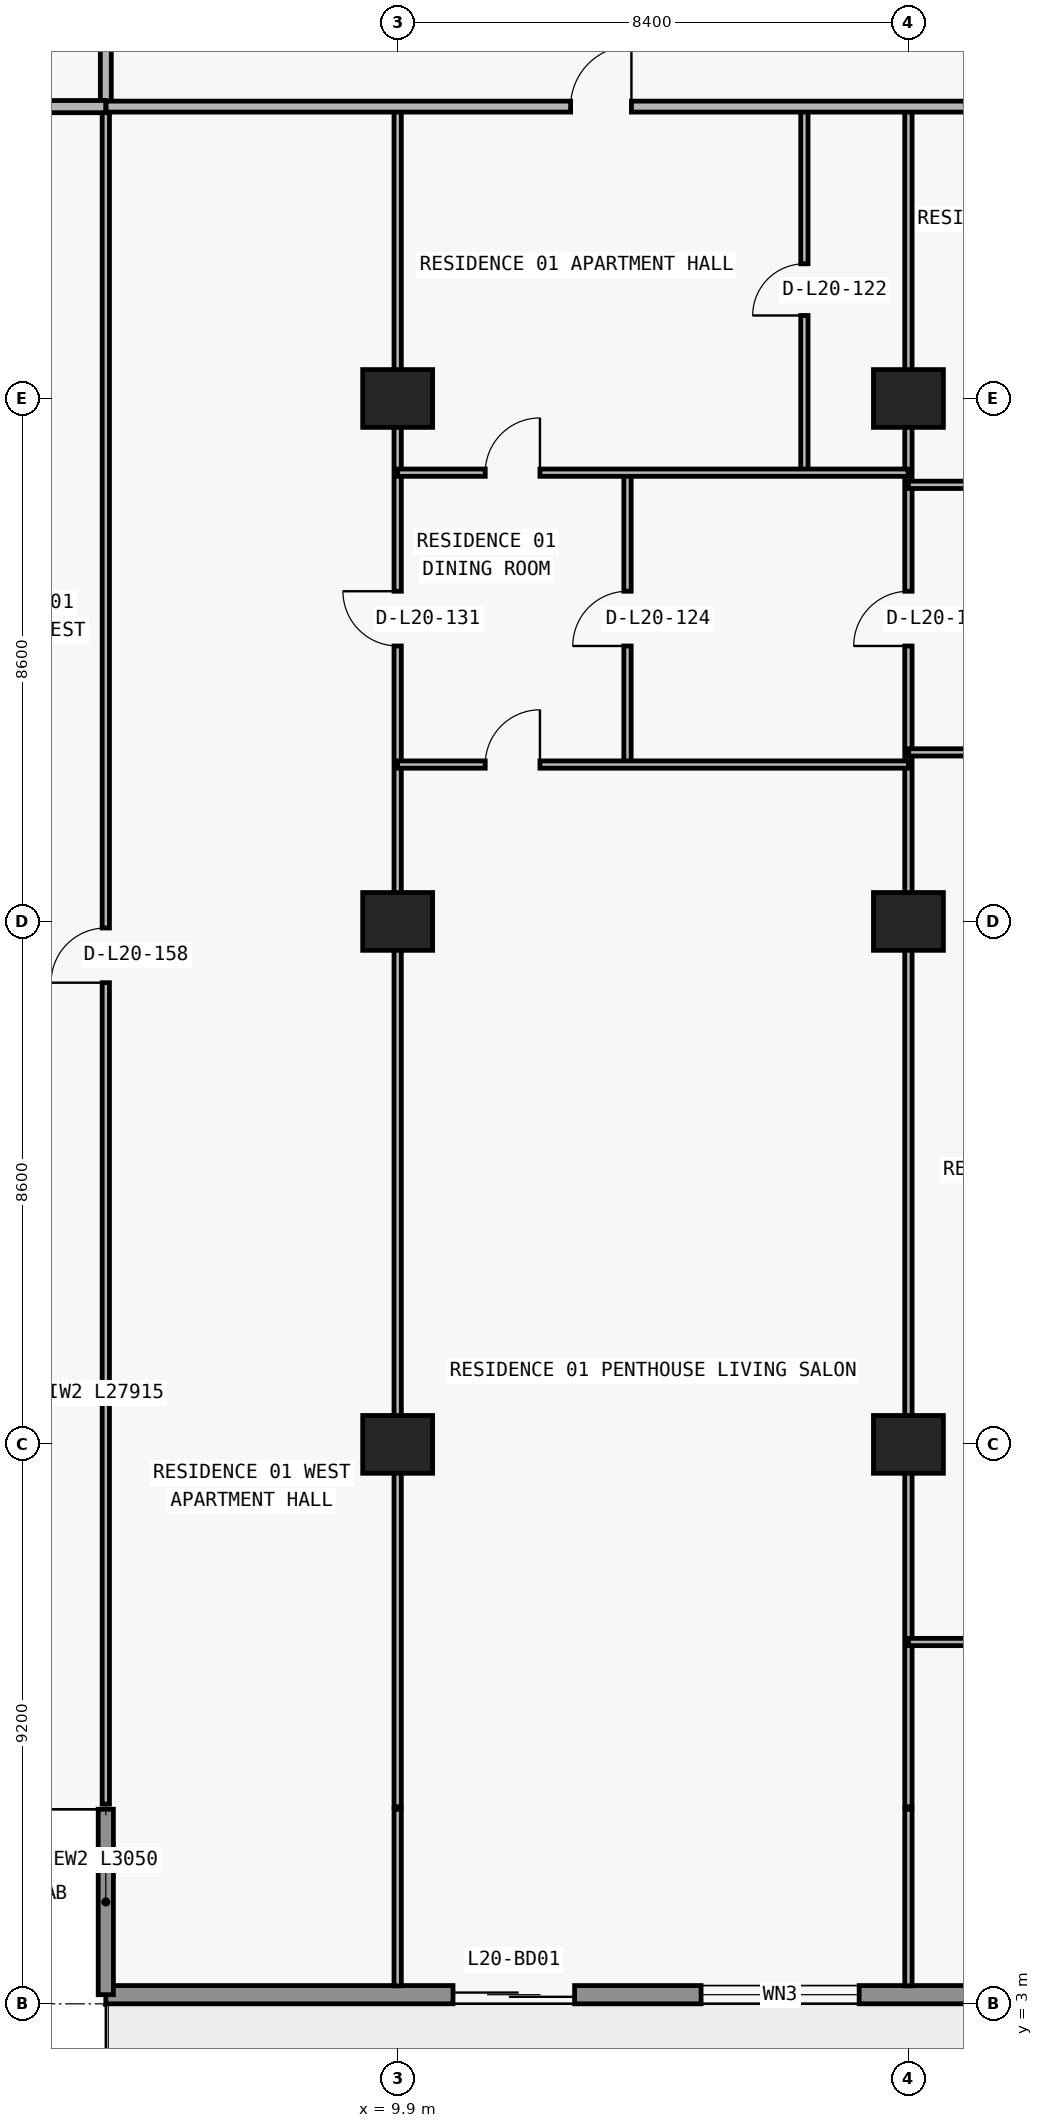
"""IFC4 building model, lengths in metres.
Left out: names, types, materials, properties, quantities, classifications, styles, units other than length and angle.
Written with IfcOpenShell. Run it as: python <this file> out.ifc"""

import sys

from ifc_helpers import new_model, si_unit, direction, frame, frame_2d, origin, origin_2d, place, context, subcontext, project, spatial, rectangle, extrude, element, fill, save


model = new_model("IFC4")
c1 = context("Model", 3, precision=1e-05, world=origin(), true_north=direction((0.0, 1.0)))
c2 = subcontext(c1, "Body", "Model", "MODEL_VIEW")
j1 = project(units=[si_unit("LENGTHUNIT", "METRE"), si_unit("PLANEANGLEUNIT", "RADIAN")], contexts=[c1])
p1 = place(None, origin())
s1 = spatial("IfcSite", under=j1, at=p1, CompositionType="ELEMENT")
p2 = place(p1, origin())
s2 = spatial("IfcBuilding", under=s1, at=p2, CompositionType="ELEMENT")
p3 = place(p2, frame((0.0, 0.0, 76.2)))
s3 = spatial("IfcBuildingStorey", under=s2, at=p3, CompositionType="ELEMENT", Elevation=76.2)
for number, where, z_axis, x_axis in (
    (1, (9.9, 12.2, 0.0), (0.0, 0.0, 1.0), (1.0, 0.0, 0.0)),
    (2, (18.3, 12.2, 0.0), (0.0, 0.0, 1.0), (1.0, 0.0, 0.0)),
    (3, (9.9, 20.8, 0.0), (0.0, 0.0, 1.0), (1.0, 0.0, 0.0)),
    (4, (18.3, 20.8, 0.0), (0.0, 0.0, 1.0), (1.0, 0.0, 0.0)),
    (5, (9.9, 29.4, 0.0), (0.0, 0.0, 1.0), (1.0, 0.0, 0.0)),
    (6, (18.3, 29.4, 0.0), (0.0, 0.0, 1.0), (1.0, 0.0, 0.0)),
):
    element("IfcColumn", number, at=place(p3, frame(where, z_axis=z_axis, x_axis=x_axis)), inside=s3, PredefinedType="COLUMN", context=c2, shape_type="SweptSolid", body=[
        extrude(rectangle(XDim=1.15, YDim=0.95, at=origin_2d()), origin(), (0.0, 0.0, 1.0), 3.0),
    ])
p4 = place(p3, frame((72.7, 3.15, 0.0), z_axis=(0.0, 0.0, 1.0), x_axis=(-1.0, 0.0, 0.0)))
e7 = element("IfcWall", 7, at=p4, inside=s3, PredefinedType="STANDARD", context=c2, shape_type="SweptSolid", body=[
    extrude(rectangle(XDim=67.6, YDim=0.3, at=frame_2d((33.8, 0.0))), origin(), (0.0, 0.0, 1.0), 3.0),
])
p5 = place(p4, frame((59.89, 0.0, 0.0)))
e8 = element("IfcOpeningElement", 8, at=p5, cuts=e7, PredefinedType="OPENING", context=c2, shape_type="SweptSolid", body=[
    extrude(rectangle(XDim=2.0, YDim=2.3, at=frame_2d((1.0, 1.15))), frame((0.0, 0.16, 0.0), z_axis=(0.0, -1.0, 0.0), x_axis=(1.0, 0.0, 0.0)), (0.0, 0.0, 1.0), 0.32),
])
p6 = place(p4, frame((55.21, 0.0, 0.65)))
e9 = element("IfcOpeningElement", 9, at=p6, cuts=e7, PredefinedType="OPENING", context=c2, shape_type="SweptSolid", body=[
    extrude(rectangle(XDim=2.6, YDim=1.85, at=frame_2d((1.3, 0.925))), frame((0.0, 0.16, 0.0), z_axis=(0.0, -1.0, 0.0), x_axis=(1.0, 0.0, 0.0)), (0.0, 0.0, 1.0), 0.32),
])
p7 = place(p4, frame((49.1, 0.0, 0.85)))
e10 = element("IfcOpeningElement", 10, at=p7, cuts=e7, PredefinedType="OPENING", context=c2, shape_type="SweptSolid", body=[
    extrude(rectangle(XDim=2.2, YDim=1.55, at=frame_2d((1.1, 0.775))), frame((0.0, 0.16, 0.0), z_axis=(0.0, -1.0, 0.0), x_axis=(1.0, 0.0, 0.0)), (0.0, 0.0, 1.0), 0.32),
])
p8 = place(p4, frame((43.09, 0.0, 0.0)))
e11 = element("IfcOpeningElement", 11, at=p8, cuts=e7, PredefinedType="OPENING", context=c2, shape_type="SweptSolid", body=[
    extrude(rectangle(XDim=2.0, YDim=2.3, at=frame_2d((1.0, 1.15))), frame((0.0, 0.16, 0.0), z_axis=(0.0, -1.0, 0.0), x_axis=(1.0, 0.0, 0.0)), (0.0, 0.0, 1.0), 0.32),
])
p9 = place(p4, frame((38.41, 0.0, 0.65)))
e12 = element("IfcOpeningElement", 12, at=p9, cuts=e7, PredefinedType="OPENING", context=c2, shape_type="SweptSolid", body=[
    extrude(rectangle(XDim=2.6, YDim=1.85, at=frame_2d((1.3, 0.925))), frame((0.0, 0.16, 0.0), z_axis=(0.0, -1.0, 0.0), x_axis=(1.0, 0.0, 0.0)), (0.0, 0.0, 1.0), 0.32),
])
p10 = place(p4, frame((32.7, 0.0, 0.85)))
e13 = element("IfcOpeningElement", 13, at=p10, cuts=e7, PredefinedType="OPENING", context=c2, shape_type="SweptSolid", body=[
    extrude(rectangle(XDim=2.2, YDim=1.55, at=frame_2d((1.1, 0.775))), frame((0.0, 0.16, 0.0), z_axis=(0.0, -1.0, 0.0), x_axis=(1.0, 0.0, 0.0)), (0.0, 0.0, 1.0), 0.32),
])
p11 = place(p4, frame((24.7, 0.0, 0.85)))
e14 = element("IfcOpeningElement", 14, at=p11, cuts=e7, PredefinedType="OPENING", context=c2, shape_type="SweptSolid", body=[
    extrude(rectangle(XDim=2.2, YDim=1.55, at=frame_2d((1.1, 0.775))), frame((0.0, 0.16, 0.0), z_axis=(0.0, -1.0, 0.0), x_axis=(1.0, 0.0, 0.0)), (0.0, 0.0, 1.0), 0.32),
])
p12 = place(p4, frame((18.69, 0.0, 0.0)))
e15 = element("IfcOpeningElement", 15, at=p12, cuts=e7, PredefinedType="OPENING", context=c2, shape_type="SweptSolid", body=[
    extrude(rectangle(XDim=2.0, YDim=2.3, at=frame_2d((1.0, 1.15))), frame((0.0, 0.16, 0.0), z_axis=(0.0, -1.0, 0.0), x_axis=(1.0, 0.0, 0.0)), (0.0, 0.0, 1.0), 0.32),
])
p13 = place(p4, frame((14.01, 0.0, 0.65)))
e16 = element("IfcOpeningElement", 16, at=p13, cuts=e7, PredefinedType="OPENING", context=c2, shape_type="SweptSolid", body=[
    extrude(rectangle(XDim=2.6, YDim=1.85, at=frame_2d((1.3, 0.925))), frame((0.0, 0.16, 0.0), z_axis=(0.0, -1.0, 0.0), x_axis=(1.0, 0.0, 0.0)), (0.0, 0.0, 1.0), 0.32),
])
p14 = place(p4, frame((7.9, 0.0, 0.85)))
e17 = element("IfcOpeningElement", 17, at=p14, cuts=e7, PredefinedType="OPENING", context=c2, shape_type="SweptSolid", body=[
    extrude(rectangle(XDim=2.2, YDim=1.55, at=frame_2d((1.1, 0.775))), frame((0.0, 0.16, 0.0), z_axis=(0.0, -1.0, 0.0), x_axis=(1.0, 0.0, 0.0)), (0.0, 0.0, 1.0), 0.32),
])
p15 = place(p3, frame((5.1, 6.2, 0.0), z_axis=(0.0, 0.0, 1.0), x_axis=(0.0, -1.0, 0.0)))
e18 = element("IfcWall", 18, at=p15, inside=s3, PredefinedType="ELEMENTEDWALL", context=c2, shape_type="SweptSolid", body=[
    extrude(rectangle(XDim=3.05, YDim=0.25, at=frame_2d((1.525, 0.0))), origin(), (0.0, 0.0, 1.0), 3.0),
])
p16 = place(p3, frame((5.1, 6.285, 0.0), z_axis=(0.0, 0.0, 1.0), x_axis=(0.0, 1.0, 0.0)))
e19 = element("IfcWall", 19, at=p16, inside=s3, PredefinedType="PARTITIONING", context=c2, shape_type="SweptSolid", body=[
    extrude(rectangle(XDim=27.915, YDim=0.12, at=frame_2d((13.958, 0.0))), origin(), (0.0, 0.0, 1.0), 3.0),
])
p17 = place(p16, frame((13.508, 0.0, 0.0)))
e20 = element("IfcOpeningElement", 20, at=p17, cuts=e19, PredefinedType="OPENING", context=c2, shape_type="SweptSolid", body=[
    extrude(rectangle(XDim=0.9, YDim=2.15, at=frame_2d((0.45, 1.075))), frame((0.0, 0.07, 0.0), z_axis=(0.0, -1.0, 0.0), x_axis=(1.0, 0.0, 0.0)), (0.0, 0.0, 1.0), 0.14),
])
p18 = place(p3, frame((5.1, 34.205, 0.0), z_axis=(0.0, 0.0, 1.0), x_axis=(0.0, 1.0, 0.0)))
e21 = element("IfcWall", 21, at=p18, inside=s3, PredefinedType="PARTITIONING", context=c2, shape_type="SweptSolid", body=[
    extrude(rectangle(XDim=2.695, YDim=0.18, at=frame_2d((1.347, 0.0))), origin(), (0.0, 0.0, 1.0), 3.0),
])
p19 = place(p3, frame((9.9, 3.295, 0.0), z_axis=(0.0, 0.0, 1.0), x_axis=(0.0, 1.0, 0.0)))
e22 = element("IfcWall", 22, at=p19, inside=s3, PredefinedType="PARTITIONING", context=c2, shape_type="SweptSolid", body=[
    extrude(rectangle(XDim=2.905, YDim=0.12, at=frame_2d((1.453, 0.0))), origin(), (0.0, 0.0, 1.0), 3.0),
])
p20 = place(p3, frame((9.9, 6.24, 0.0), z_axis=(0.0, 0.0, 1.0), x_axis=(0.0, 1.0, 0.0)))
e23 = element("IfcWall", 23, at=p20, inside=s3, PredefinedType="PARTITIONING", context=c2, shape_type="SweptSolid", body=[
    extrude(rectangle(XDim=27.96, YDim=0.12, at=frame_2d((13.98, 0.0))), origin(), (0.0, 0.0, 1.0), 2.06),
])
p21 = place(p20, frame((19.09, 0.0, 0.0)))
e24 = element("IfcOpeningElement", 24, at=p21, cuts=e23, PredefinedType="OPENING", context=c2, shape_type="SweptSolid", body=[
    extrude(rectangle(XDim=0.9, YDim=2.01, at=frame_2d((0.45, 1.005))), frame((0.0, 0.07, 0.0), z_axis=(0.0, -1.0, 0.0), x_axis=(1.0, 0.0, 0.0)), (0.0, 0.0, 1.0), 0.14),
])
p22 = place(p3, frame((13.68, 23.38, 0.0), z_axis=(0.0, 0.0, 1.0), x_axis=(0.0, 1.0, 0.0)))
e25 = element("IfcWall", 25, at=p22, inside=s3, PredefinedType="PARTITIONING", context=c2, shape_type="SweptSolid", body=[
    extrude(rectangle(XDim=4.8, YDim=0.12, at=frame_2d((2.4, 0.0))), origin(), (0.0, 0.0, 1.0), 3.0),
])
p23 = place(p22, frame((1.95, 0.0, 0.0)))
e26 = element("IfcOpeningElement", 26, at=p23, cuts=e25, PredefinedType="OPENING", context=c2, shape_type="SweptSolid", body=[
    extrude(rectangle(XDim=0.9, YDim=2.15, at=frame_2d((0.45, 1.075))), frame((0.0, 0.07, 0.0), z_axis=(0.0, -1.0, 0.0), x_axis=(1.0, 0.0, 0.0)), (0.0, 0.0, 1.0), 0.14),
])
p24 = place(p3, frame((16.589, 28.18, 0.0), z_axis=(0.0, 0.0, 1.0), x_axis=(0.0, 1.0, 0.0)))
e27 = element("IfcWall", 27, at=p24, inside=s3, PredefinedType="PARTITIONING", context=c2, shape_type="SweptSolid", body=[
    extrude(rectangle(XDim=6.02, YDim=0.12, at=frame_2d((3.01, 0.0))), origin(), (0.0, 0.0, 1.0), 3.0),
])
p25 = place(p24, frame((2.585, 0.0, 0.0)))
e28 = element("IfcOpeningElement", 28, at=p25, cuts=e27, PredefinedType="OPENING", context=c2, shape_type="SweptSolid", body=[
    extrude(rectangle(XDim=0.85, YDim=2.1, at=frame_2d((0.425, 1.05))), frame((0.0, 0.07, 0.0), z_axis=(0.0, -1.0, 0.0), x_axis=(1.0, 0.0, 0.0)), (0.0, 0.0, 1.0), 0.14),
])
p26 = place(p3, frame((18.3, 3.295, 0.0), z_axis=(0.0, 0.0, 1.0), x_axis=(0.0, 1.0, 0.0)))
e29 = element("IfcWall", 29, at=p26, inside=s3, PredefinedType="PARTITIONING", context=c2, shape_type="SweptSolid", body=[
    extrude(rectangle(XDim=2.905, YDim=0.12, at=frame_2d((1.453, 0.0))), origin(), (0.0, 0.0, 1.0), 3.0),
])
p27 = place(p3, frame((18.3, 6.24, 0.0), z_axis=(0.0, 0.0, 1.0), x_axis=(0.0, 1.0, 0.0)))
e30 = element("IfcWall", 30, at=p27, inside=s3, PredefinedType="PARTITIONING", context=c2, shape_type="SweptSolid", body=[
    extrude(rectangle(XDim=27.96, YDim=0.12, at=frame_2d((13.98, 0.0))), origin(), (0.0, 0.0, 1.0), 2.06),
])
p28 = place(p27, frame((19.09, 0.0, 0.0)))
e31 = element("IfcOpeningElement", 31, at=p28, cuts=e30, PredefinedType="OPENING", context=c2, shape_type="SweptSolid", body=[
    extrude(rectangle(XDim=0.9, YDim=2.01, at=frame_2d((0.45, 1.005))), frame((0.0, 0.07, 0.0), z_axis=(0.0, -1.0, 0.0), x_axis=(1.0, 0.0, 0.0)), (0.0, 0.0, 1.0), 0.14),
])
p29 = place(p3, frame((18.3, 8.95, 0.0), z_axis=(0.0, 0.0, 1.0), x_axis=(1.0, 0.0, 0.0)))
e32 = element("IfcWall", 32, at=p29, inside=s3, PredefinedType="PARTITIONING", context=c2, shape_type="SweptSolid", body=[
    extrude(rectangle(XDim=8.4, YDim=0.12, at=frame_2d((4.2, 0.0))), origin(), (0.0, 0.0, 1.0), 3.0),
])
p30 = place(p29, frame((3.75, 0.0, 0.0)))
e33 = element("IfcOpeningElement", 33, at=p30, cuts=e32, PredefinedType="OPENING", context=c2, shape_type="SweptSolid", body=[
    extrude(rectangle(XDim=0.9, YDim=2.15, at=frame_2d((0.45, 1.075))), frame((0.0, 0.07, 0.0), z_axis=(0.0, -1.0, 0.0), x_axis=(1.0, 0.0, 0.0)), (0.0, 0.0, 1.0), 0.14),
])
p31 = place(p3, frame((9.9, 23.38, 0.0), z_axis=(0.0, 0.0, 1.0), x_axis=(1.0, 0.0, 0.0)))
e34 = element("IfcWall", 34, at=p31, inside=s3, PredefinedType="PARTITIONING", context=c2, shape_type="SweptSolid", body=[
    extrude(rectangle(XDim=8.4, YDim=0.12, at=frame_2d((4.2, 0.0))), origin(), (0.0, 0.0, 1.0), 3.0),
])
p32 = place(p31, frame((1.44, 0.0, 0.0)))
e35 = element("IfcOpeningElement", 35, at=p32, cuts=e34, PredefinedType="OPENING", context=c2, shape_type="SweptSolid", body=[
    extrude(rectangle(XDim=0.9, YDim=2.15, at=frame_2d((0.45, 1.075))), frame((0.0, 0.07, 0.0), z_axis=(0.0, -1.0, 0.0), x_axis=(1.0, 0.0, 0.0)), (0.0, 0.0, 1.0), 0.14),
])
p33 = place(p3, frame((18.305, 23.58, 0.0), z_axis=(0.0, 0.0, 1.0), x_axis=(1.0, 0.0, 0.0)))
e36 = element("IfcWall", 36, at=p33, inside=s3, PredefinedType="PARTITIONING", context=c2, shape_type="SweptSolid", body=[
    extrude(rectangle(XDim=8.125, YDim=0.12, at=frame_2d((4.062, 0.0))), origin(), (0.0, 0.0, 1.0), 3.0),
])
p34 = place(p33, frame((3.613, 0.0, 0.0)))
e37 = element("IfcOpeningElement", 37, at=p34, cuts=e36, PredefinedType="OPENING", context=c2, shape_type="SweptSolid", body=[
    extrude(rectangle(XDim=0.9, YDim=2.15, at=frame_2d((0.45, 1.075))), frame((0.0, 0.07, 0.0), z_axis=(0.0, -1.0, 0.0), x_axis=(1.0, 0.0, 0.0)), (0.0, 0.0, 1.0), 0.14),
])
p35 = place(p3, frame((18.3, 27.98, 0.0), z_axis=(0.0, 0.0, 1.0), x_axis=(1.0, 0.0, 0.0)))
e38 = element("IfcWall", 38, at=p35, inside=s3, PredefinedType="PARTITIONING", context=c2, shape_type="SweptSolid", body=[
    extrude(rectangle(XDim=8.13, YDim=0.12, at=frame_2d((4.065, 0.0))), origin(), (0.0, 0.0, 1.0), 3.0),
])
p36 = place(p35, frame((2.979, 0.0, 0.0)))
e39 = element("IfcOpeningElement", 39, at=p36, cuts=e38, PredefinedType="OPENING", context=c2, shape_type="SweptSolid", body=[
    extrude(rectangle(XDim=0.9, YDim=2.15, at=frame_2d((0.45, 1.075))), frame((0.0, 0.07, 0.0), z_axis=(0.0, -1.0, 0.0), x_axis=(1.0, 0.0, 0.0)), (0.0, 0.0, 1.0), 0.14),
])
p37 = place(p3, frame((9.9, 28.18, 0.0), z_axis=(0.0, 0.0, 1.0), x_axis=(1.0, 0.0, 0.0)))
e40 = element("IfcWall", 40, at=p37, inside=s3, PredefinedType="PARTITIONING", context=c2, shape_type="SweptSolid", body=[
    extrude(rectangle(XDim=8.395, YDim=0.12, at=frame_2d((4.198, 0.0))), origin(), (0.0, 0.0, 1.0), 3.0),
])
p38 = place(p37, frame((1.44, 0.0, 0.0)))
e41 = element("IfcOpeningElement", 41, at=p38, cuts=e40, PredefinedType="OPENING", context=c2, shape_type="SweptSolid", body=[
    extrude(rectangle(XDim=0.9, YDim=2.15, at=frame_2d((0.45, 1.075))), frame((0.0, 0.07, 0.0), z_axis=(0.0, -1.0, 0.0), x_axis=(1.0, 0.0, 0.0)), (0.0, 0.0, 1.0), 0.14),
])
p39 = place(p3, frame((1.795, 34.2, 0.0), z_axis=(0.0, 0.0, 1.0), x_axis=(1.0, 0.0, 0.0)))
e42 = element("IfcWall", 42, at=p39, inside=s3, PredefinedType="PARTITIONING", context=c2, shape_type="SweptSolid", body=[
    extrude(rectangle(XDim=3.305, YDim=0.2, at=frame_2d((1.653, 0.0))), origin(), (0.0, 0.0, 1.0), 3.0),
])
p40 = place(p3, frame((5.105, 34.2, 0.0), z_axis=(0.0, 0.0, 1.0), x_axis=(1.0, 0.0, 0.0)))
e43 = element("IfcWall", 43, at=p40, inside=s3, PredefinedType="PARTITIONING", context=c2, shape_type="SweptSolid", body=[
    extrude(rectangle(XDim=67.595, YDim=0.18, at=frame_2d((33.797, 0.0))), origin(), (0.0, 0.0, 1.0), 3.0),
])
p41 = place(p40, frame((7.639, 0.0, 0.0)))
e44 = element("IfcOpeningElement", 44, at=p41, cuts=e43, PredefinedType="OPENING", context=c2, shape_type="SweptSolid", body=[
    extrude(rectangle(XDim=1.0, YDim=2.2, at=frame_2d((0.5, 1.1))), frame((0.0, 0.1, 0.0), z_axis=(0.0, -1.0, 0.0), x_axis=(1.0, 0.0, 0.0)), (0.0, 0.0, 1.0), 0.2),
])
p42 = place(p40, frame((24.423, 0.0, 0.0)))
e45 = element("IfcOpeningElement", 45, at=p42, cuts=e43, PredefinedType="OPENING", context=c2, shape_type="SweptSolid", body=[
    extrude(rectangle(XDim=1.0, YDim=2.2, at=frame_2d((0.5, 1.1))), frame((0.0, 0.1, 0.0), z_axis=(0.0, -1.0, 0.0), x_axis=(1.0, 0.0, 0.0)), (0.0, 0.0, 1.0), 0.2),
])
p43 = place(p40, frame((48.825, 0.0, 0.0)))
e46 = element("IfcOpeningElement", 46, at=p43, cuts=e43, PredefinedType="OPENING", context=c2, shape_type="SweptSolid", body=[
    extrude(rectangle(XDim=1.0, YDim=2.2, at=frame_2d((0.5, 1.1))), frame((0.0, 0.1, 0.0), z_axis=(0.0, -1.0, 0.0), x_axis=(1.0, 0.0, 0.0)), (0.0, 0.0, 1.0), 0.2),
])
p44 = place(p5, origin())
e47 = element("IfcDoor", 47, at=p44, inside=s3, OperationType="DOUBLE_DOOR_SLIDING", PredefinedType="DOOR", context=c2, shape_type="SweptSolid", body=[
    extrude(rectangle(XDim=2.0, YDim=2.3, at=frame_2d((1.0, 1.15))), frame((0.0, 0.025, 0.0), z_axis=(0.0, -1.0, 0.0), x_axis=(1.0, 0.0, 0.0)), (0.0, 0.0, 1.0), 0.05),
])
fill(e8, e47)
p45 = place(p6, origin())
e48 = element("IfcWindow", 48, at=p45, inside=s3, PartitioningType="SINGLE_PANEL", PredefinedType="WINDOW", context=c2, shape_type="SweptSolid", body=[
    extrude(rectangle(XDim=2.6, YDim=1.85, at=frame_2d((1.3, 0.925))), frame((0.0, 0.03, 0.0), z_axis=(0.0, -1.0, 0.0), x_axis=(1.0, 0.0, 0.0)), (0.0, 0.0, 1.0), 0.06),
])
fill(e9, e48)
p46 = place(p41, origin())
e49 = element("IfcDoor", 49, at=p46, inside=s3, OperationType="SINGLE_SWING_RIGHT", PredefinedType="DOOR", context=c2, shape_type="SweptSolid", body=[
    extrude(rectangle(XDim=1.0, YDim=2.2, at=frame_2d((0.5, 1.1))), frame((0.0, 0.025, 0.0), z_axis=(0.0, -1.0, 0.0), x_axis=(1.0, 0.0, 0.0)), (0.0, 0.0, 1.0), 0.05),
])
fill(e44, e49)
p47 = place(p25, origin())
e50 = element("IfcDoor", 50, at=p47, inside=s3, OperationType="SINGLE_SWING_LEFT", PredefinedType="DOOR", context=c2, shape_type="SweptSolid", body=[
    extrude(rectangle(XDim=0.85, YDim=2.1, at=frame_2d((0.425, 1.05))), frame((0.0, 0.025, 0.0), z_axis=(0.0, -1.0, 0.0), x_axis=(1.0, 0.0, 0.0)), (0.0, 0.0, 1.0), 0.05),
])
fill(e28, e50)
p48 = place(p38, origin())
e51 = element("IfcDoor", 51, at=p48, inside=s3, OperationType="SINGLE_SWING_RIGHT", PredefinedType="DOOR", context=c2, shape_type="SweptSolid", body=[
    extrude(rectangle(XDim=0.9, YDim=2.15, at=frame_2d((0.45, 1.075))), frame((0.0, 0.025, 0.0), z_axis=(0.0, -1.0, 0.0), x_axis=(1.0, 0.0, 0.0)), (0.0, 0.0, 1.0), 0.05),
])
fill(e41, e51)
p49 = place(p23, origin())
e52 = element("IfcDoor", 52, at=p49, inside=s3, OperationType="SINGLE_SWING_LEFT", PredefinedType="DOOR", context=c2, shape_type="SweptSolid", body=[
    extrude(rectangle(XDim=0.9, YDim=2.15, at=frame_2d((0.45, 1.075))), frame((0.0, 0.025, 0.0), z_axis=(0.0, -1.0, 0.0), x_axis=(1.0, 0.0, 0.0)), (0.0, 0.0, 1.0), 0.05),
])
fill(e26, e52)
p50 = place(p32, origin())
e53 = element("IfcDoor", 53, at=p50, inside=s3, OperationType="SINGLE_SWING_RIGHT", PredefinedType="DOOR", context=c2, shape_type="SweptSolid", body=[
    extrude(rectangle(XDim=0.9, YDim=2.15, at=frame_2d((0.45, 1.075))), frame((0.0, 0.025, 0.0), z_axis=(0.0, -1.0, 0.0), x_axis=(1.0, 0.0, 0.0)), (0.0, 0.0, 1.0), 0.05),
])
fill(e35, e53)
p51 = place(p28, origin())
e54 = element("IfcDoor", 54, at=p51, inside=s3, OperationType="SINGLE_SWING_LEFT", PredefinedType="DOOR", context=c2, shape_type="SweptSolid", body=[
    extrude(rectangle(XDim=0.9, YDim=2.01, at=frame_2d((0.45, 1.005))), frame((0.0, 0.025, 0.0), z_axis=(0.0, -1.0, 0.0), x_axis=(1.0, 0.0, 0.0)), (0.0, 0.0, 1.0), 0.05),
])
fill(e31, e54)
p52 = place(p21, origin())
e55 = element("IfcDoor", 55, at=p52, inside=s3, OperationType="SINGLE_SWING_RIGHT", PredefinedType="DOOR", context=c2, shape_type="SweptSolid", body=[
    extrude(rectangle(XDim=0.9, YDim=2.01, at=frame_2d((0.45, 1.005))), frame((0.0, 0.025, 0.0), z_axis=(0.0, -1.0, 0.0), x_axis=(1.0, 0.0, 0.0)), (0.0, 0.0, 1.0), 0.05),
])
fill(e24, e55)
p53 = place(p17, origin())
e56 = element("IfcDoor", 56, at=p53, inside=s3, OperationType="SINGLE_SWING_LEFT", PredefinedType="DOOR", context=c2, shape_type="SweptSolid", body=[
    extrude(rectangle(XDim=0.9, YDim=2.15, at=frame_2d((0.45, 1.075))), frame((0.0, 0.025, 0.0), z_axis=(0.0, -1.0, 0.0), x_axis=(1.0, 0.0, 0.0)), (0.0, 0.0, 1.0), 0.05),
])
fill(e20, e56)
save(model, sys.argv[1])
